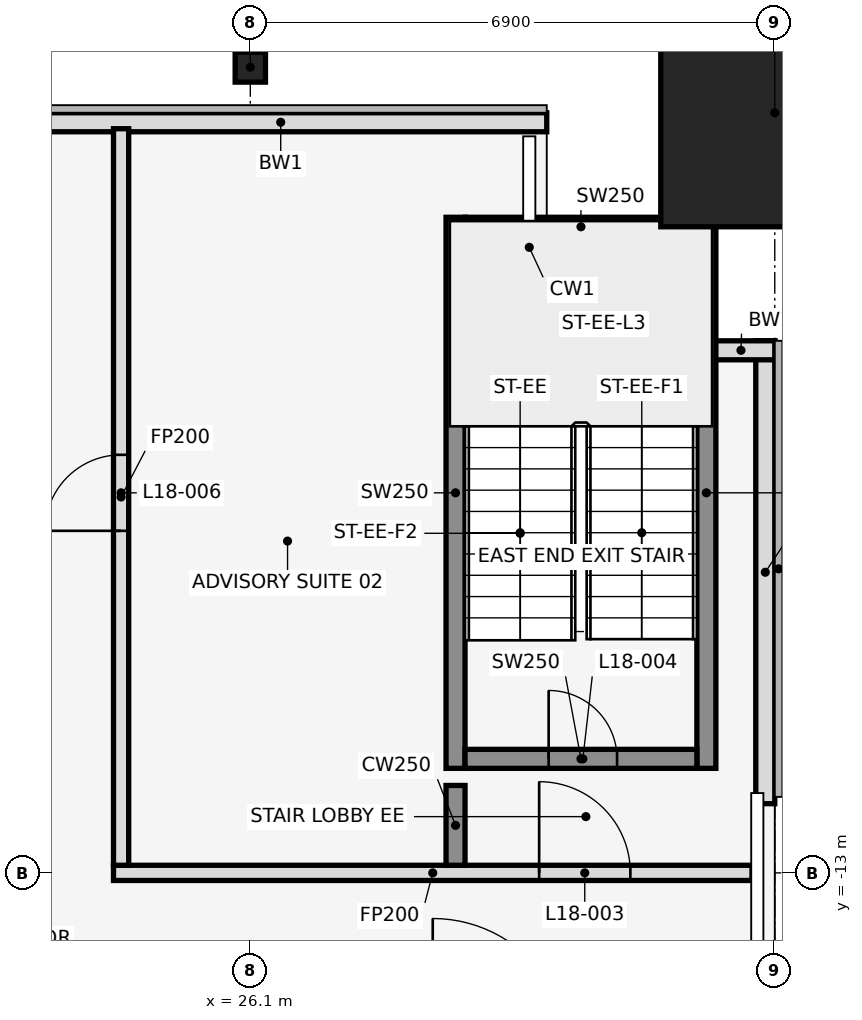
"""IFC4 building model, lengths in metres.
Left out: names, types, materials, properties, quantities, classifications, styles, units other than length and angle.
Written with IfcOpenShell. Run it as: python <this file> out.ifc"""

import sys

from ifc_helpers import new_model, si_unit, direction, frame, frame_2d, origin, origin_2d, place, context, subcontext, project, spatial, rectangle, hollow_rectangle, i_section, extrude, element, fill, save


model = new_model("IFC4")
c1 = context("Model", 3, precision=1e-05, world=origin(), true_north=direction((0.0, 1.0)))
c2 = subcontext(c1, "Body", "Model", "MODEL_VIEW")
j1 = project(units=[si_unit("LENGTHUNIT", "METRE"), si_unit("PLANEANGLEUNIT", "RADIAN")], contexts=[c1])
p1 = place(None, origin())
s1 = spatial("IfcSite", under=j1, at=p1, CompositionType="ELEMENT")
p2 = place(p1, origin())
s2 = spatial("IfcBuilding", under=s1, at=p2, CompositionType="ELEMENT")
p3 = place(p2, frame((0.0, 0.0, 89.9)))
s3 = spatial("IfcBuildingStorey", under=s2, at=p3, CompositionType="ELEMENT", Elevation=89.9)
p4 = place(p3, frame((26.1, -2.4, 0.0), z_axis=(0.0, 0.0, 1.0), x_axis=(1.0, 0.0, 0.0)))
e1 = element("IfcColumn", 1, at=p4, inside=s3, PredefinedType="COLUMN", context=c2, shape_type="SweptSolid", body=[
    extrude(i_section(OverallWidth=0.399, OverallDepth=0.394, WebThickness=0.023, FlangeThickness=0.037, at=origin_2d()), origin(), (0.0, 0.0, 1.0), 4.1),
])
p5 = place(p3, frame((33.0, -3.0, 0.0), z_axis=(0.0, 0.0, 1.0), x_axis=(1.0, 0.0, 0.0)))
e2 = element("IfcColumn", 2, at=p5, inside=s3, PredefinedType="COLUMN", context=c2, shape_type="SweptSolid", body=[
    extrude(hollow_rectangle(XDim=3.0, YDim=3.0, WallThickness=0.09, at=origin_2d()), origin(), (0.0, 0.0, 1.0), 4.1),
])
p6 = place(p3, frame((32.875, -12.09, 0.0), z_axis=(0.0, 0.0, 1.0), x_axis=(0.0, 1.0, 0.0)))
e3 = element("IfcWall", 3, at=p6, inside=s3, PredefinedType="STANDARD", context=c2, shape_type="SweptSolid", body=[
    extrude(rectangle(XDim=6.09, YDim=0.25, at=frame_2d((3.045, 0.0))), origin(), (0.0, 0.0, 1.0), 3.95),
])
p7 = place(p3, frame((33.0, -6.125, 0.0), z_axis=(0.0, 0.0, 1.0), x_axis=(-1.0, 0.0, 0.0)))
e4 = element("IfcWall", 4, at=p7, inside=s3, PredefinedType="STANDARD", context=c2, shape_type="SweptSolid", body=[
    extrude(rectangle(XDim=0.89, YDim=0.25, at=frame_2d((0.445, 0.0))), origin(), (0.0, 0.0, 1.0), 3.95),
])
p8 = place(p3, frame((30.0, -3.125, 0.0), z_axis=(0.0, 0.0, 1.0), x_axis=(-1.0, 0.0, 0.0)))
e5 = element("IfcWall", 5, at=p8, inside=s3, PredefinedType="STANDARD", context=c2, shape_type="SweptSolid", body=[
    extrude(rectangle(XDim=7.0, YDim=0.25, at=frame_2d((3.5, 0.0))), origin(), (0.0, 0.0, 1.0), 3.95),
])
for number, where, z_axis, x_axis in (
    (6, (28.8, -11.625, 0.0), (0.0, 0.0, 1.0), (0.0, 1.0, 0.0)),
    (7, (32.1, -11.625, 0.0), (0.0, 0.0, 1.0), (0.0, 1.0, 0.0)),
):
    element("IfcWall", number, at=place(p3, frame(where, z_axis=z_axis, x_axis=x_axis)), inside=s3, PredefinedType="SHEAR", context=c2, shape_type="SweptSolid", body=[
        extrude(rectangle(XDim=7.25, YDim=0.25, at=frame_2d((3.625, 0.0))), origin(), (0.0, 0.0, 1.0), 4.1),
    ])
p9 = place(p3, frame((28.925, -11.5, 0.0), z_axis=(0.0, 0.0, 1.0), x_axis=(1.0, 0.0, 0.0)))
e8 = element("IfcWall", 8, at=p9, inside=s3, PredefinedType="SHEAR", context=c2, shape_type="SweptSolid", body=[
    extrude(rectangle(XDim=3.05, YDim=0.25, at=frame_2d((1.525, 0.0))), origin(), (0.0, 0.0, 1.0), 4.1),
])
p10 = place(p9, frame((1.1, 0.0, 0.0)))
e9 = element("IfcOpeningElement", 9, at=p10, cuts=e8, PredefinedType="OPENING", context=c2, shape_type="SweptSolid", body=[
    extrude(rectangle(XDim=0.9, YDim=2.1, at=frame_2d((0.45, 1.05))), frame((0.0, 0.137, 0.0), z_axis=(0.0, -1.0, 0.0), x_axis=(1.0, 0.0, 0.0)), (0.0, 0.0, 1.0), 0.274),
])
p11 = place(p3, frame((28.925, -4.5, 0.0), z_axis=(0.0, 0.0, 1.0), x_axis=(1.0, 0.0, 0.0)))
e10 = element("IfcWall", 10, at=p11, inside=s3, PredefinedType="SHEAR", context=c2, shape_type="SweptSolid", body=[
    extrude(rectangle(XDim=3.05, YDim=0.25, at=frame_2d((1.525, 0.0))), origin(), (0.0, 0.0, 1.0), 4.1),
])
p12 = place(p3, frame((24.3, -13.0, 0.0), z_axis=(0.0, 0.0, 1.0), x_axis=(1.0, 0.0, 0.0)))
e11 = element("IfcWall", 11, at=p12, inside=s3, PredefinedType="PARTITIONING", context=c2, shape_type="SweptSolid", body=[
    extrude(rectangle(XDim=8.4, YDim=0.2, at=frame_2d((4.2, 0.0))), origin(), (0.0, 0.0, 1.0), 3.018),
])
p13 = place(p12, frame((5.6, 0.0, 0.0)))
e12 = element("IfcOpeningElement", 12, at=p13, cuts=e11, PredefinedType="OPENING", context=c2, shape_type="SweptSolid", body=[
    extrude(rectangle(XDim=1.2, YDim=2.1, at=frame_2d((0.6, 1.05))), frame((0.0, 0.112, 0.0), z_axis=(0.0, -1.0, 0.0), x_axis=(1.0, 0.0, 0.0)), (0.0, 0.0, 1.0), 0.224),
])
p14 = place(p3, frame((24.4, -12.9, 0.0), z_axis=(0.0, 0.0, 1.0), x_axis=(0.0, 1.0, 0.0)))
e13 = element("IfcWall", 13, at=p14, inside=s3, PredefinedType="PARTITIONING", context=c2, shape_type="SweptSolid", body=[
    extrude(rectangle(XDim=9.69, YDim=0.2, at=frame_2d((4.845, 0.0))), origin(), (0.0, 0.0, 1.0), 3.018),
])
p15 = place(p14, frame((4.4, 0.0, 0.0)))
e14 = element("IfcOpeningElement", 14, at=p15, cuts=e13, PredefinedType="OPENING", context=c2, shape_type="SweptSolid", body=[
    extrude(rectangle(XDim=1.0, YDim=2.1, at=frame_2d((0.5, 1.05))), frame((0.0, 0.112, 0.0), z_axis=(0.0, -1.0, 0.0), x_axis=(1.0, 0.0, 0.0)), (0.0, 0.0, 1.0), 0.224),
])
p16 = place(p3, frame((28.8, -12.9, 0.0), z_axis=(0.0, 0.0, 1.0), x_axis=(0.0, 1.0, 0.0)))
e15 = element("IfcWall", 15, at=p16, inside=s3, PredefinedType="SHEAR", context=c2, shape_type="SweptSolid", body=[
    extrude(rectangle(XDim=1.05, YDim=0.25, at=frame_2d((0.525, 0.0))), origin(), (0.0, 0.0, 1.0), 4.1),
])
p17 = place(p13, origin())
e16 = element("IfcDoor", 16, at=p17, inside=s3, OperationType="SINGLE_SWING_RIGHT", PredefinedType="DOOR", context=c2, shape_type="SweptSolid", body=[
    extrude(rectangle(XDim=1.2, YDim=2.1, at=frame_2d((0.6, 1.05))), frame((0.0, 0.025, 0.0), z_axis=(0.0, -1.0, 0.0), x_axis=(1.0, 0.0, 0.0)), (0.0, 0.0, 1.0), 0.05),
])
fill(e12, e16)
p18 = place(p10, origin())
e17 = element("IfcDoor", 17, at=p18, inside=s3, OperationType="SINGLE_SWING_LEFT", PredefinedType="DOOR", context=c2, shape_type="SweptSolid", body=[
    extrude(rectangle(XDim=0.9, YDim=2.1, at=frame_2d((0.45, 1.05))), frame((0.0, 0.025, 0.0), z_axis=(0.0, -1.0, 0.0), x_axis=(1.0, 0.0, 0.0)), (0.0, 0.0, 1.0), 0.05),
])
fill(e9, e17)
p19 = place(p15, frame((1.0, 0.0, 0.0), z_axis=(0.0, 0.0, 1.0), x_axis=(-1.0, 0.0, 0.0)))
e18 = element("IfcDoor", 18, at=p19, inside=s3, OperationType="SINGLE_SWING_RIGHT", PredefinedType="DOOR", context=c2, shape_type="SweptSolid", body=[
    extrude(rectangle(XDim=1.0, YDim=2.1, at=frame_2d((0.5, 1.05))), frame((0.0, 0.025, 0.0), z_axis=(0.0, -1.0, 0.0), x_axis=(1.0, 0.0, 0.0)), (0.0, 0.0, 1.0), 0.05),
])
fill(e14, e18)
save(model, sys.argv[1])
